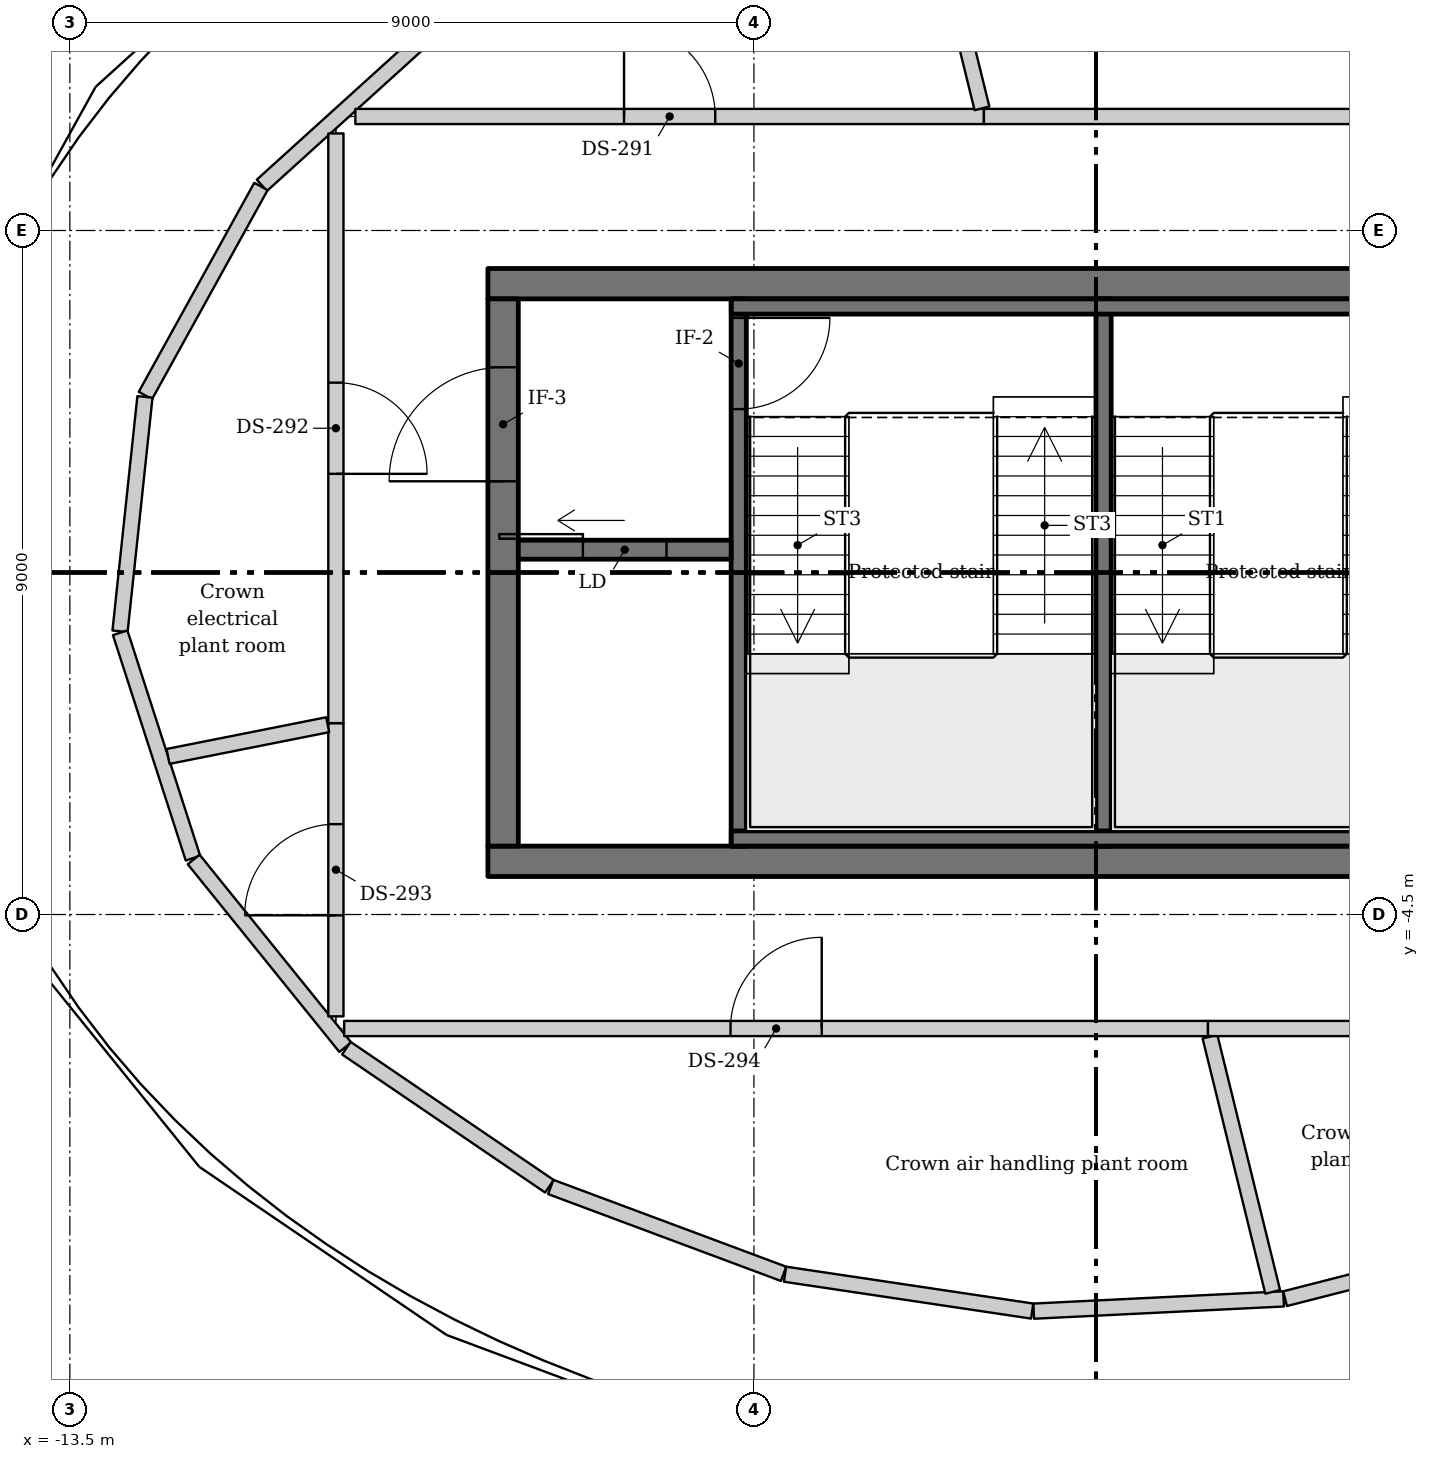
"""IFC4 building model, lengths in metres.
Left out: names, types, materials, properties, quantities, classifications, styles, units other than length and angle.
Written with IfcOpenShell. Run it as: python <this file> out.ifc"""

import sys

from ifc_helpers import new_model, si_unit, direction, frame, frame_2d, origin, place, context, subcontext, project, spatial, rectangle, extrude, source, transform, mapped, element, fill, save


model = new_model("IFC4")
c1 = context("Model", 3, precision=1e-05, world=origin(), true_north=direction((0.0, 1.0)))
c2 = subcontext(c1, "Body", "Model", "MODEL_VIEW")
j1 = project(units=[si_unit("LENGTHUNIT", "METRE"), si_unit("PLANEANGLEUNIT", "RADIAN")], contexts=[c1])
p1 = place(None, origin())
s1 = spatial("IfcSite", under=j1, at=p1, CompositionType="ELEMENT")
p2 = place(p1, origin())
s2 = spatial("IfcBuilding", under=s1, at=p2, CompositionType="ELEMENT")
p3 = place(p2, frame((0.0, 0.0, 365.5)))
s3 = spatial("IfcBuildingStorey", under=s2, at=p3, CompositionType="ELEMENT", Elevation=365.5)
m1 = source(origin(), c2, "Body", "SweptSolid", [
    extrude(rectangle(XDim=16.0, YDim=0.4, at=frame_2d((8.0, 0.0))), origin(), (0.0, 0.0, 1.0), 4.5),
])
for number, where, z_axis, x_axis in (
    (1, (-8.0, 3.8, -0.25), (0.0, 0.0, 1.0), (1.0, 0.0, 0.0)),
    (2, (-8.0, -3.8, -0.25), (0.0, 0.0, 1.0), (1.0, 0.0, 0.0)),
):
    element("IfcWall", number, at=place(p3, frame(where, z_axis=z_axis, x_axis=x_axis)), inside=s3, PredefinedType="SHEAR", context=c2, shape_type="MappedRepresentation", body=[
        mapped(m1, transform((0.0, 0.0, 0.0))),
    ])
m2 = source(origin(), c2, "Body", "SweptSolid", [
    extrude(rectangle(XDim=7.2, YDim=0.4, at=frame_2d((3.6, 0.0))), origin(), (0.0, 0.0, 1.0), 4.5),
])
p4 = place(p3, frame((-7.8, -3.6, -0.25), z_axis=(0.0, 0.0, 1.0), x_axis=(0.0, 1.0, 0.0)))
e3 = element("IfcWall", 3, at=p4, inside=s3, PredefinedType="SHEAR", context=c2, shape_type="MappedRepresentation", body=[
    mapped(m2, transform((0.0, 0.0, 0.0))),
])
m3 = source(origin(), c2, "Body", "SweptSolid", [
    extrude(rectangle(XDim=1.5, YDim=2.1, at=frame_2d((0.75, 1.05))), frame((0.0, 0.21, 0.0), z_axis=(0.0, -1.0, 0.0), x_axis=(1.0, 0.0, 0.0)), (0.0, 0.0, 1.0), 0.42),
])
p5 = place(p4, frame((4.8, 0.0, 0.25)))
e4 = element("IfcOpeningElement", 4, at=p5, cuts=e3, PredefinedType="OPENING", context=c2, shape_type="MappedRepresentation", body=[
    mapped(m3, transform((0.0, 0.0, 0.0))),
])
m4 = source(origin(), c2, "Body", "SweptSolid", [
    extrude(rectangle(XDim=3.205, YDim=0.2, at=frame_2d((1.603, 0.0))), origin(), (0.0, 0.0, 1.0), 4.25),
])
p6 = place(p3, frame((-10.974, 5.094, 0.0), z_axis=(0.0, 0.0, 1.0), x_axis=(0.741131432131, 0.671359963289, 0.0)))
e5 = element("IfcWall", 5, at=p6, inside=s3, PredefinedType="SOLIDWALL", context=c2, shape_type="MappedRepresentation", body=[
    mapped(m4, transform((0.0, 0.0, 0.0))),
])
m5 = source(origin(), c2, "Body", "SweptSolid", [
    extrude(rectangle(XDim=3.142, YDim=0.2, at=frame_2d((1.571, 0.0))), origin(), (0.0, 0.0, 1.0), 4.25),
])
p7 = place(p3, frame((-12.506, 2.329, 0.0), z_axis=(0.0, 0.0, 1.0), x_axis=(0.48375502956, 0.875203445706, 0.0)))
e6 = element("IfcWall", 6, at=p7, inside=s3, PredefinedType="SOLIDWALL", context=c2, shape_type="MappedRepresentation", body=[
    mapped(m5, transform((0.0, 0.0, 0.0))),
])
m6 = source(origin(), c2, "Body", "SweptSolid", [
    extrude(rectangle(XDim=3.101, YDim=0.2, at=frame_2d((1.551, 0.0))), origin(), (0.0, 0.0, 1.0), 4.25),
])
p8 = place(p3, frame((-12.84, -0.774, 0.0), z_axis=(0.0, 0.0, 1.0), x_axis=(0.105721464197, 0.994395782376, 0.0)))
e7 = element("IfcWall", 7, at=p8, inside=s3, PredefinedType="SOLIDWALL", context=c2, shape_type="MappedRepresentation", body=[
    mapped(m6, transform((0.0, 0.0, 0.0))),
])
m7 = source(origin(), c2, "Body", "SweptSolid", [
    extrude(rectangle(XDim=3.116, YDim=0.2, at=frame_2d((1.558, 0.0))), origin(), (0.0, 0.0, 1.0), 4.25),
])
p9 = place(p3, frame((-11.881, -3.759, 0.0), z_axis=(0.0, 0.0, 1.0), x_axis=(-0.307282044067, 0.951618487312, 0.0)))
e8 = element("IfcWall", 8, at=p9, inside=s3, PredefinedType="SOLIDWALL", context=c2, shape_type="MappedRepresentation", body=[
    mapped(m7, transform((0.0, 0.0, 0.0))),
])
m8 = source(origin(), c2, "Body", "SweptSolid", [
    extrude(rectangle(XDim=3.175, YDim=0.2, at=frame_2d((1.587, 0.0))), origin(), (0.0, 0.0, 1.0), 4.25),
])
p10 = place(p3, frame((-9.876, -6.246, 0.0), z_axis=(0.0, 0.0, 1.0), x_axis=(-0.628308465475, 0.777964312943, 0.0)))
e9 = element("IfcWall", 9, at=p10, inside=s3, PredefinedType="SOLIDWALL", context=c2, shape_type="MappedRepresentation", body=[
    mapped(m8, transform((0.0, 0.0, 0.0))),
])
m9 = source(origin(), c2, "Body", "SweptSolid", [
    extrude(rectangle(XDim=3.23, YDim=0.2, at=frame_2d((1.615, 0.0))), origin(), (0.0, 0.0, 1.0), 4.25),
])
p11 = place(p3, frame((-7.191, -8.076, 0.0), z_axis=(0.0, 0.0, 1.0), x_axis=(-0.826887140507, 0.562367901701, 0.0)))
e10 = element("IfcWall", 10, at=p11, inside=s3, PredefinedType="SOLIDWALL", context=c2, shape_type="MappedRepresentation", body=[
    mapped(m9, transform((0.0, 0.0, 0.0))),
])
m10 = source(origin(), c2, "Body", "SweptSolid", [
    extrude(rectangle(XDim=3.269, YDim=0.2, at=frame_2d((1.635, 0.0))), origin(), (0.0, 0.0, 1.0), 4.25),
])
p12 = place(p3, frame((-4.11, -9.228, 0.0), z_axis=(0.0, 0.0, 1.0), x_axis=(-0.936886529357, 0.34963356691, 0.0)))
e11 = element("IfcWall", 11, at=p12, inside=s3, PredefinedType="SOLIDWALL", context=c2, shape_type="MappedRepresentation", body=[
    mapped(m10, transform((0.0, 0.0, 0.0))),
])
m11 = source(origin(), c2, "Body", "SweptSolid", [
    extrude(rectangle(XDim=3.288, YDim=0.2, at=frame_2d((1.644, 0.0))), origin(), (0.0, 0.0, 1.0), 4.25),
])
p13 = place(p3, frame((-0.839, -9.718, 0.0), z_axis=(0.0, 0.0, 1.0), x_axis=(-0.989054235862, 0.147552426358, 0.0)))
e12 = element("IfcWall", 12, at=p13, inside=s3, PredefinedType="SOLIDWALL", context=c2, shape_type="MappedRepresentation", body=[
    mapped(m11, transform((0.0, 0.0, 0.0))),
])
m12 = source(origin(), c2, "Body", "SweptSolid", [
    extrude(rectangle(XDim=3.292, YDim=0.2, at=frame_2d((1.646, 0.0))), origin(), (0.0, 0.0, 1.0), 4.25),
])
p14 = place(p3, frame((2.468, -9.558, 0.0), z_axis=(0.0, 0.0, 1.0), x_axis=(-0.998797426177, -0.049027558199, 0.0)))
e13 = element("IfcWall", 13, at=p14, inside=s3, PredefinedType="SOLIDWALL", context=c2, shape_type="MappedRepresentation", body=[
    mapped(m12, transform((0.0, 0.0, 0.0))),
])
m13 = source(origin(), c2, "Body", "SweptSolid", [
    extrude(rectangle(XDim=3.28, YDim=0.2, at=frame_2d((1.64, 0.0))), origin(), (0.0, 0.0, 1.0), 4.25),
])
p15 = place(p3, frame((5.666, -8.743, 0.0), z_axis=(0.0, 0.0, 1.0), x_axis=(-0.968908599462, -0.247418927911, 0.0)))
e14 = element("IfcWall", 14, at=p15, inside=s3, PredefinedType="SOLIDWALL", context=c2, shape_type="MappedRepresentation", body=[
    mapped(m13, transform((0.0, 0.0, 0.0))),
])
m14 = source(origin(), c2, "Body", "SweptSolid", [
    extrude(rectangle(XDim=7.2, YDim=0.2, at=frame_2d((3.6, 0.0))), origin(), (0.0, 0.0, 1.0), 4.25),
])
p16 = place(p3, frame((0.1, 3.6, 0.0), z_axis=(0.0, 0.0, 1.0), x_axis=(0.0, -1.0, 0.0)))
e15 = element("IfcWall", 15, at=p16, inside=s3, PredefinedType="SHEAR", context=c2, shape_type="MappedRepresentation", body=[
    mapped(m14, transform((0.0, 0.0, 0.0))),
])
p17 = place(p3, frame((-4.7, 3.6, 0.0), z_axis=(0.0, 0.0, 1.0), x_axis=(0.0, -1.0, 0.0)))
e16 = element("IfcWall", 16, at=p17, inside=s3, PredefinedType="SHEAR", context=c2, shape_type="MappedRepresentation", body=[
    mapped(m14, transform((0.0, 0.0, 0.0))),
])
m15 = source(origin(), c2, "Body", "SweptSolid", [
    extrude(rectangle(XDim=1.2, YDim=2.1, at=frame_2d((0.6, 1.05))), frame((0.0, 0.11, 0.0), z_axis=(0.0, -1.0, 0.0), x_axis=(1.0, 0.0, 0.0)), (0.0, 0.0, 1.0), 0.22),
])
p18 = place(p17, frame((0.25, 0.0, 0.0)))
e17 = element("IfcOpeningElement", 17, at=p18, cuts=e16, PredefinedType="OPENING", context=c2, shape_type="MappedRepresentation", body=[
    mapped(m15, transform((0.0, 0.0, 0.0))),
])
m16 = source(origin(), c2, "Body", "SweptSolid", [
    extrude(rectangle(XDim=2.8, YDim=0.25, at=frame_2d((1.4, 0.0))), origin(), (0.0, 0.0, 1.0), 4.25),
])
p19 = place(p3, frame((-4.8, 0.3, 0.0), z_axis=(0.0, 0.0, 1.0), x_axis=(-1.0, 0.0, 0.0)))
e18 = element("IfcWall", 18, at=p19, inside=s3, PredefinedType="SHEAR", context=c2, shape_type="MappedRepresentation", body=[
    mapped(m16, transform((0.0, 0.0, 0.0))),
])
m17 = source(origin(), c2, "Body", "SweptSolid", [
    extrude(rectangle(XDim=1.1, YDim=2.1, at=frame_2d((0.55, 1.05))), frame((0.0, 0.135, 0.0), z_axis=(0.0, -1.0, 0.0), x_axis=(1.0, 0.0, 0.0)), (0.0, 0.0, 1.0), 0.27),
])
p20 = place(p19, frame((0.85, 0.0, 0.0)))
e19 = element("IfcOpeningElement", 19, at=p20, cuts=e18, PredefinedType="OPENING", context=c2, shape_type="MappedRepresentation", body=[
    mapped(m17, transform((0.0, 0.0, 0.0))),
])
m18 = source(origin(), c2, "Body", "SweptSolid", [
    extrude(rectangle(XDim=9.596, YDim=0.2, at=frame_2d((4.798, 0.0))), origin(), (0.0, 0.0, 1.0), 4.25),
])
for number, where, z_axis, x_axis in (
    (20, (-4.798, -3.5, 0.0), (0.0, 0.0, 1.0), (1.0, 0.0, 0.0)),
    (21, (4.798, 3.5, 0.0), (0.0, 0.0, 1.0), (-1.0, 0.0, 0.0)),
):
    element("IfcWall", number, at=place(p3, frame(where, z_axis=z_axis, x_axis=x_axis)), inside=s3, PredefinedType="SHEAR", context=c2, shape_type="MappedRepresentation", body=[
        mapped(m18, transform((0.0, 0.0, 0.0))),
    ])
m19 = source(origin(), c2, "Body", "SweptSolid", [
    extrude(rectangle(XDim=3.858, YDim=0.2, at=frame_2d((1.929, 0.0))), origin(), (0.0, 0.0, 1.0), 4.25),
])
p21 = place(p3, frame((-10.0, -5.84, 0.0), z_axis=(0.0, 0.0, 1.0), x_axis=(0.0, 1.0, 0.0)))
e22 = element("IfcWall", 22, at=p21, inside=s3, PredefinedType="PARTITIONING", context=c2, shape_type="MappedRepresentation", body=[
    mapped(m19, transform((0.0, 0.0, 0.0))),
])
p22 = place(p21, frame((1.329, 0.0, 0.0)))
e23 = element("IfcOpeningElement", 23, at=p22, cuts=e22, PredefinedType="OPENING", context=c2, shape_type="MappedRepresentation", body=[
    mapped(m15, transform((0.0, 0.0, 0.0))),
])
m20 = source(origin(), c2, "Body", "SweptSolid", [
    extrude(rectangle(XDim=2.141, YDim=0.2, at=frame_2d((1.071, 0.0))), origin(), (0.0, 0.0, 1.0), 4.25),
])
p23 = place(p3, frame((-10.108, -2.003, 0.0), z_axis=(0.0, 0.0, 1.0), x_axis=(-0.980851641364, -0.194756405888, 0.0)))
e24 = element("IfcWall", 24, at=p23, inside=s3, PredefinedType="PARTITIONING", context=c2, shape_type="MappedRepresentation", body=[
    mapped(m20, transform((0.0, 0.0, 0.0))),
])
m21 = source(origin(), c2, "Body", "SweptSolid", [
    extrude(rectangle(XDim=7.759, YDim=0.2, at=frame_2d((3.879, 0.0))), origin(), (0.0, 0.0, 1.0), 4.25),
])
p24 = place(p3, frame((-10.0, -1.982, 0.0), z_axis=(0.0, 0.0, 1.0), x_axis=(0.0, 1.0, 0.0)))
e25 = element("IfcWall", 25, at=p24, inside=s3, PredefinedType="PARTITIONING", context=c2, shape_type="MappedRepresentation", body=[
    mapped(m21, transform((0.0, 0.0, 0.0))),
])
p25 = place(p24, frame((3.28, 0.0, 0.0)))
e26 = element("IfcOpeningElement", 26, at=p25, cuts=e25, PredefinedType="OPENING", context=c2, shape_type="MappedRepresentation", body=[
    mapped(m15, transform((0.0, 0.0, 0.0))),
])
m22 = source(origin(), c2, "Body", "SweptSolid", [
    extrude(rectangle(XDim=8.27, YDim=0.2, at=frame_2d((4.135, 0.0))), origin(), (0.0, 0.0, 1.0), 4.25),
])
p26 = place(p3, frame((-9.744, 6.0, 0.0), z_axis=(0.0, 0.0, 1.0), x_axis=(1.0, 0.0, 0.0)))
e27 = element("IfcWall", 27, at=p26, inside=s3, PredefinedType="PARTITIONING", context=c2, shape_type="MappedRepresentation", body=[
    mapped(m22, transform((0.0, 0.0, 0.0))),
])
p27 = place(p26, frame((3.535, 0.0, 0.0)))
e28 = element("IfcOpeningElement", 28, at=p27, cuts=e27, PredefinedType="OPENING", context=c2, shape_type="MappedRepresentation", body=[
    mapped(m15, transform((0.0, 0.0, 0.0))),
])
m23 = source(origin(), c2, "Body", "SweptSolid", [
    extrude(rectangle(XDim=3.458, YDim=0.2, at=frame_2d((1.729, 0.0))), origin(), (0.0, 0.0, 1.0), 4.25),
])
p28 = place(p3, frame((-1.5, 6.107, 0.0), z_axis=(0.0, 0.0, 1.0), x_axis=(-0.238563284271, 0.971126953286, 0.0)))
e29 = element("IfcWall", 29, at=p28, inside=s3, PredefinedType="PARTITIONING", context=c2, shape_type="MappedRepresentation", body=[
    mapped(m23, transform((0.0, 0.0, 0.0))),
])
m24 = source(origin(), c2, "Body", "SweptSolid", [
    extrude(rectangle(XDim=11.365, YDim=0.2, at=frame_2d((5.683, 0.0))), origin(), (0.0, 0.0, 1.0), 4.25),
])
p29 = place(p3, frame((-1.474, 6.0, 0.0), z_axis=(0.0, 0.0, 1.0), x_axis=(1.0, 0.0, 0.0)))
e30 = element("IfcWall", 30, at=p29, inside=s3, PredefinedType="PARTITIONING", context=c2, shape_type="MappedRepresentation", body=[
    mapped(m24, transform((0.0, 0.0, 0.0))),
])
p30 = place(p29, frame((5.082, 0.0, 0.0)))
e31 = element("IfcOpeningElement", 31, at=p30, cuts=e30, PredefinedType="OPENING", context=c2, shape_type="MappedRepresentation", body=[
    mapped(m15, transform((0.0, 0.0, 0.0))),
])
p31 = place(p3, frame((1.474, -6.0, 0.0), z_axis=(0.0, 0.0, 1.0), x_axis=(-1.0, 0.0, 0.0)))
e32 = element("IfcWall", 32, at=p31, inside=s3, PredefinedType="PARTITIONING", context=c2, shape_type="MappedRepresentation", body=[
    mapped(m24, transform((0.0, 0.0, 0.0))),
])
p32 = place(p31, frame((5.082, 0.0, 0.0)))
e33 = element("IfcOpeningElement", 33, at=p32, cuts=e32, PredefinedType="OPENING", context=c2, shape_type="MappedRepresentation", body=[
    mapped(m15, transform((0.0, 0.0, 0.0))),
])
p33 = place(p3, frame((1.5, -6.107, 0.0), z_axis=(0.0, 0.0, 1.0), x_axis=(0.238563284271, -0.971126953286, 0.0)))
e34 = element("IfcWall", 34, at=p33, inside=s3, PredefinedType="PARTITIONING", context=c2, shape_type="MappedRepresentation", body=[
    mapped(m23, transform((0.0, 0.0, 0.0))),
])
p34 = place(p3, frame((9.744, -6.0, 0.0), z_axis=(0.0, 0.0, 1.0), x_axis=(-1.0, 0.0, 0.0)))
e35 = element("IfcWall", 35, at=p34, inside=s3, PredefinedType="PARTITIONING", context=c2, shape_type="MappedRepresentation", body=[
    mapped(m22, transform((0.0, 0.0, 0.0))),
])
p35 = place(p34, frame((3.535, 0.0, 0.0)))
e36 = element("IfcOpeningElement", 36, at=p35, cuts=e35, PredefinedType="OPENING", context=c2, shape_type="MappedRepresentation", body=[
    mapped(m15, transform((0.0, 0.0, 0.0))),
])
m25 = source(origin(), c2, "Body", "SweptSolid", [
    extrude(rectangle(XDim=1.1, YDim=2.1, at=frame_2d((0.55, 1.05))), frame((0.0, 0.025, 0.0), z_axis=(0.0, -1.0, 0.0), x_axis=(1.0, 0.0, 0.0)), (0.0, 0.0, 1.0), 0.05),
])
p36 = place(p20, origin())
e37 = element("IfcDoor", 37, at=p36, inside=s3, OperationType="SLIDING_TO_RIGHT", PredefinedType="DOOR", context=c2, shape_type="MappedRepresentation", body=[
    mapped(m25, transform((0.0, 0.0, 0.0))),
])
fill(e19, e37)
m26 = source(origin(), c2, "Body", "SweptSolid", [
    extrude(rectangle(XDim=1.2, YDim=2.1, at=frame_2d((0.6, 1.05))), frame((0.0, 0.025, 0.0), z_axis=(0.0, -1.0, 0.0), x_axis=(1.0, 0.0, 0.0)), (0.0, 0.0, 1.0), 0.05),
])
p37 = place(p18, origin())
e38 = element("IfcDoor", 38, at=p37, inside=s3, OperationType="SINGLE_SWING_LEFT", PredefinedType="DOOR", context=c2, shape_type="MappedRepresentation", body=[
    mapped(m26, transform((0.0, 0.0, 0.0))),
])
fill(e17, e38)
m27 = source(origin(), c2, "Body", "SweptSolid", [
    extrude(rectangle(XDim=1.5, YDim=2.1, at=frame_2d((0.75, 1.05))), frame((0.0, 0.025, 0.0), z_axis=(0.0, -1.0, 0.0), x_axis=(1.0, 0.0, 0.0)), (0.0, 0.0, 1.0), 0.05),
])
p38 = place(p5, origin())
e39 = element("IfcDoor", 39, at=p38, inside=s3, OperationType="DOUBLE_DOOR_SINGLE_SWING", PredefinedType="DOOR", context=c2, shape_type="MappedRepresentation", body=[
    mapped(m27, transform((0.0, 0.0, 0.0))),
])
fill(e4, e39)
m28 = source(origin(), c2, "Body", "SweptSolid", [
    extrude(rectangle(XDim=1.2, YDim=2.1, at=frame_2d((0.6, 1.05))), frame((0.0, 0.025, 0.0), z_axis=(0.0, -1.0, 0.0), x_axis=(1.0, 0.0, 0.0)), (0.0, 0.0, 1.0), 0.05),
])
p39 = place(p27, origin())
e40 = element("IfcDoor", 40, at=p39, inside=s3, OperationType="SINGLE_SWING_LEFT", PredefinedType="DOOR", context=c2, shape_type="MappedRepresentation", body=[
    mapped(m28, transform((0.0, 0.0, 0.0))),
])
fill(e28, e40)
p40 = place(p25, origin())
e41 = element("IfcDoor", 41, at=p40, inside=s3, OperationType="SINGLE_SWING_LEFT", PredefinedType="DOOR", context=c2, shape_type="MappedRepresentation", body=[
    mapped(m28, transform((0.0, 0.0, 0.0))),
])
fill(e26, e41)
p41 = place(p22, origin())
e42 = element("IfcDoor", 42, at=p41, inside=s3, OperationType="SINGLE_SWING_LEFT", PredefinedType="DOOR", context=c2, shape_type="MappedRepresentation", body=[
    mapped(m28, transform((0.0, 0.0, 0.0))),
])
fill(e23, e42)
p42 = place(p32, origin())
e43 = element("IfcDoor", 43, at=p42, inside=s3, OperationType="SINGLE_SWING_LEFT", PredefinedType="DOOR", context=c2, shape_type="MappedRepresentation", body=[
    mapped(m28, transform((0.0, 0.0, 0.0))),
])
fill(e33, e43)
save(model, sys.argv[1])
